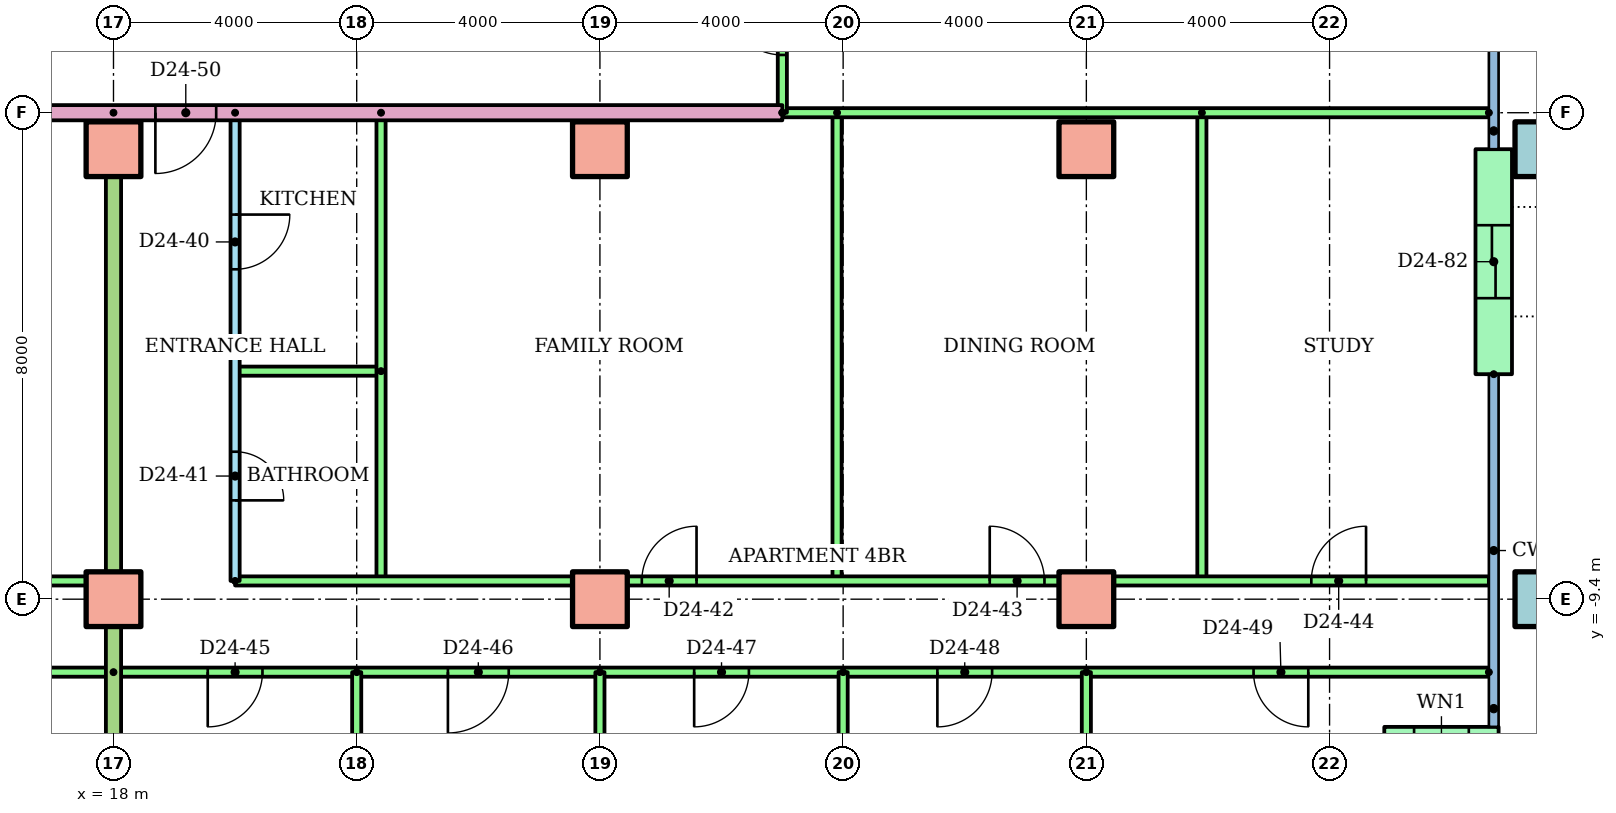
"""IFC4 building model, lengths in metres.
Left out: names, types, materials, properties, quantities, classifications, styles, units other than length and angle.
Written with IfcOpenShell. Run it as: python <this file> out.ifc"""

import sys

from ifc_helpers import new_model, si_unit, direction, frame, frame_2d, origin, origin_2d, place, context, subcontext, project, spatial, rectangle, hollow_rectangle, extrude, element, fill, save


model = new_model("IFC4")
c1 = context("Model", 3, precision=1e-05, world=origin(), true_north=direction((0.0, 1.0)))
c2 = subcontext(c1, "Body", "Model", "MODEL_VIEW")
j1 = project(units=[si_unit("LENGTHUNIT", "METRE"), si_unit("PLANEANGLEUNIT", "RADIAN")], contexts=[c1])
p1 = place(None, origin())
s1 = spatial("IfcSite", under=j1, at=p1, CompositionType="ELEMENT")
p2 = place(p1, origin())
s2 = spatial("IfcBuilding", under=s1, at=p2, CompositionType="ELEMENT")
p3 = place(p2, frame((0.0, 0.0, 93.5)))
s3 = spatial("IfcBuildingStorey", under=s2, at=p3, CompositionType="ELEMENT", Elevation=93.5)
for number, where in (
    (1, (18.0, -9.4, 0.0)),
    (2, (26.0, -9.4, 0.0)),
    (3, (34.0, -9.4, 0.0)),
):
    element("IfcColumn", number, at=place(p3, frame(where)), inside=s3, PredefinedType="COLUMN", context=c2, shape_type="SweptSolid", body=[
        extrude(rectangle(XDim=0.9, YDim=0.9, at=origin_2d()), origin(), (0.0, 0.0, 1.0), 3.2),
    ])
p4 = place(p3, frame((41.5, -9.4, 0.0)))
e4 = element("IfcColumn", 4, at=p4, inside=s3, PredefinedType="COLUMN", context=c2, shape_type="SweptSolid", body=[
    extrude(hollow_rectangle(XDim=0.9, YDim=0.9, WallThickness=0.045, at=origin_2d()), origin(), (0.0, 0.0, 1.0), 3.2),
])
for number, where in (
    (5, (18.0, -2.0, 0.0)),
    (6, (26.0, -2.0, 0.0)),
    (7, (34.0, -2.0, 0.0)),
):
    element("IfcColumn", number, at=place(p3, frame(where)), inside=s3, PredefinedType="COLUMN", context=c2, shape_type="SweptSolid", body=[
        extrude(rectangle(XDim=0.9, YDim=0.9, at=origin_2d()), origin(), (0.0, 0.0, 1.0), 3.2),
    ])
p5 = place(p3, frame((41.5, -2.0, 0.0)))
e8 = element("IfcColumn", 8, at=p5, inside=s3, PredefinedType="COLUMN", context=c2, shape_type="SweptSolid", body=[
    extrude(hollow_rectangle(XDim=0.9, YDim=0.9, WallThickness=0.045, at=origin_2d()), origin(), (0.0, 0.0, 1.0), 3.2),
])
p6 = place(p3, frame((38.9, -11.8, 0.0)))
e9 = element("IfcWall", 9, at=p6, inside=s3, PredefinedType="STANDARD", context=c2, shape_type="SweptSolid", body=[
    extrude(rectangle(XDim=1.88, YDim=0.6, at=frame_2d((0.94, 0.0))), origin(), (0.0, 0.0, 1.0), 2.92),
])
p7 = place(p6, frame((0.49, 0.0, 0.9)))
e10 = element("IfcOpeningElement", 10, at=p7, cuts=e9, PredefinedType="OPENING", context=c2, shape_type="SweptSolid", body=[
    extrude(rectangle(XDim=0.9, YDim=1.5, at=frame_2d((0.45, 0.75))), frame((0.0, 0.31, 0.0), z_axis=(0.0, -1.0, 0.0), x_axis=(1.0, 0.0, 0.0)), (0.0, 0.0, 1.0), 0.62),
])
p8 = place(p3, frame((40.7, -5.7, 0.0), z_axis=(0.0, 0.0, 1.0), x_axis=(0.0, 1.0, 0.0)))
e11 = element("IfcWall", 11, at=p8, inside=s3, PredefinedType="STANDARD", context=c2, shape_type="SweptSolid", body=[
    extrude(rectangle(XDim=3.7, YDim=0.6, at=frame_2d((1.85, 0.0))), origin(), (0.0, 0.0, 1.0), 2.92),
])
p9 = place(p8, frame((1.25, 0.0, 0.0)))
e12 = element("IfcOpeningElement", 12, at=p9, cuts=e11, PredefinedType="OPENING", context=c2, shape_type="SweptSolid", body=[
    extrude(rectangle(XDim=1.2, YDim=2.1, at=frame_2d((0.6, 1.05))), frame((0.0, 0.31, 0.0), z_axis=(0.0, -1.0, 0.0), x_axis=(1.0, 0.0, 0.0)), (0.0, 0.0, 1.0), 0.62),
])
p10 = place(p3, frame((4.0, -9.1, 0.0)))
e13 = element("IfcWall", 13, at=p10, inside=s3, PredefinedType="PARTITIONING", context=c2, shape_type="SweptSolid", body=[
    extrude(rectangle(XDim=14.0, YDim=0.15, at=frame_2d((7.0, 0.0))), origin(), (0.0, 0.0, 1.0), 2.4),
])
p11 = place(p10, frame((3.45, 0.0, 0.0)))
e14 = element("IfcOpeningElement", 14, at=p11, cuts=e13, PredefinedType="OPENING", context=c2, shape_type="SweptSolid", body=[
    extrude(rectangle(XDim=0.9, YDim=2.1, at=frame_2d((0.45, 1.05))), frame((0.0, 0.085, 0.0), z_axis=(0.0, -1.0, 0.0), x_axis=(1.0, 0.0, 0.0)), (0.0, 0.0, 1.0), 0.17),
])
p12 = place(p10, frame((6.825, 0.0, 0.0)))
e15 = element("IfcOpeningElement", 15, at=p12, cuts=e13, PredefinedType="OPENING", context=c2, shape_type="SweptSolid", body=[
    extrude(rectangle(XDim=0.9, YDim=2.1, at=frame_2d((0.45, 1.05))), frame((0.0, 0.085, 0.0), z_axis=(0.0, -1.0, 0.0), x_axis=(1.0, 0.0, 0.0)), (0.0, 0.0, 1.0), 0.17),
])
p13 = place(p10, frame((11.125, 0.0, 0.0)))
e16 = element("IfcOpeningElement", 16, at=p13, cuts=e13, PredefinedType="OPENING", context=c2, shape_type="SweptSolid", body=[
    extrude(rectangle(XDim=0.9, YDim=2.1, at=frame_2d((0.45, 1.05))), frame((0.0, 0.085, 0.0), z_axis=(0.0, -1.0, 0.0), x_axis=(1.0, 0.0, 0.0)), (0.0, 0.0, 1.0), 0.17),
])
p14 = place(p3, frame((18.0, -10.6, 0.0), z_axis=(0.0, 0.0, 1.0), x_axis=(-1.0, 0.0, 0.0)))
e17 = element("IfcWall", 17, at=p14, inside=s3, PredefinedType="PARTITIONING", context=c2, shape_type="SweptSolid", body=[
    extrude(rectangle(XDim=16.0, YDim=0.15, at=frame_2d((8.0, 0.0))), origin(), (0.0, 0.0, 1.0), 2.4),
])
p15 = place(p14, frame((11.5, 0.0, 0.0)))
e18 = element("IfcOpeningElement", 18, at=p15, cuts=e17, PredefinedType="OPENING", context=c2, shape_type="SweptSolid", body=[
    extrude(rectangle(XDim=1.0, YDim=2.1, at=frame_2d((0.5, 1.05))), frame((0.0, 0.085, 0.0), z_axis=(0.0, -1.0, 0.0), x_axis=(1.0, 0.0, 0.0)), (0.0, 0.0, 1.0), 0.17),
])
p16 = place(p14, frame((5.55, 0.0, 0.0)))
e19 = element("IfcOpeningElement", 19, at=p16, cuts=e17, PredefinedType="OPENING", context=c2, shape_type="SweptSolid", body=[
    extrude(rectangle(XDim=0.9, YDim=2.1, at=frame_2d((0.45, 1.05))), frame((0.0, 0.085, 0.0), z_axis=(0.0, -1.0, 0.0), x_axis=(1.0, 0.0, 0.0)), (0.0, 0.0, 1.0), 0.17),
])
p17 = place(p14, frame((1.55, 0.0, 0.0)))
e20 = element("IfcOpeningElement", 20, at=p17, cuts=e17, PredefinedType="OPENING", context=c2, shape_type="SweptSolid", body=[
    extrude(rectangle(XDim=0.9, YDim=2.1, at=frame_2d((0.45, 1.05))), frame((0.0, 0.085, 0.0), z_axis=(0.0, -1.0, 0.0), x_axis=(1.0, 0.0, 0.0)), (0.0, 0.0, 1.0), 0.17),
])
p18 = place(p3, frame((20.0, -1.4, 0.0), z_axis=(0.0, 0.0, 1.0), x_axis=(0.0, -1.0, 0.0)))
e21 = element("IfcWall", 21, at=p18, inside=s3, PredefinedType="PARTITIONING", context=c2, shape_type="SweptSolid", body=[
    extrude(rectangle(XDim=7.7, YDim=0.15, at=frame_2d((3.85, 0.0))), origin(), (0.0, 0.0, 1.0), 2.4),
])
p19 = place(p18, frame((1.675, 0.0, 0.0)))
e22 = element("IfcOpeningElement", 22, at=p19, cuts=e21, PredefinedType="OPENING", context=c2, shape_type="SweptSolid", body=[
    extrude(rectangle(XDim=0.9, YDim=2.1, at=frame_2d((0.45, 1.05))), frame((0.0, 0.085, 0.0), z_axis=(0.0, -1.0, 0.0), x_axis=(1.0, 0.0, 0.0)), (0.0, 0.0, 1.0), 0.17),
])
p20 = place(p18, frame((5.575, 0.0, 0.0)))
e23 = element("IfcOpeningElement", 23, at=p20, cuts=e21, PredefinedType="OPENING", context=c2, shape_type="SweptSolid", body=[
    extrude(rectangle(XDim=0.8, YDim=2.1, at=frame_2d((0.4, 1.05))), frame((0.0, 0.085, 0.0), z_axis=(0.0, -1.0, 0.0), x_axis=(1.0, 0.0, 0.0)), (0.0, 0.0, 1.0), 0.17),
])
p21 = place(p3, frame((22.4, -5.65, 0.0), z_axis=(0.0, 0.0, 1.0), x_axis=(-1.0, 0.0, 0.0)))
e24 = element("IfcWall", 24, at=p21, inside=s3, PredefinedType="PARTITIONING", context=c2, shape_type="SweptSolid", body=[
    extrude(rectangle(XDim=2.4, YDim=0.15, at=frame_2d((1.2, 0.0))), origin(), (0.0, 0.0, 1.0), 2.4),
])
for number, where, z_axis, x_axis in (
    (25, (22.4, -1.4, 0.0), (0.0, 0.0, 1.0), (0.0, -1.0, 0.0)),
    (26, (29.9, -1.4, 0.0), (0.0, 0.0, 1.0), (0.0, -1.0, 0.0)),
    (27, (35.9, -1.4, 0.0), (0.0, 0.0, 1.0), (0.0, -1.0, 0.0)),
):
    element("IfcWall", number, at=place(p3, frame(where, z_axis=z_axis, x_axis=x_axis)), inside=s3, PredefinedType="PARTITIONING", context=c2, shape_type="SweptSolid", body=[
        extrude(rectangle(XDim=7.7, YDim=0.15, at=frame_2d((3.85, 0.0))), origin(), (0.0, 0.0, 1.0), 2.4),
    ])
p22 = place(p3, frame((20.0, -9.1, 0.0)))
e28 = element("IfcWall", 28, at=p22, inside=s3, PredefinedType="PARTITIONING", context=c2, shape_type="SweptSolid", body=[
    extrude(rectangle(XDim=20.62, YDim=0.15, at=frame_2d((10.31, 0.0))), origin(), (0.0, 0.0, 1.0), 2.4),
])
p23 = place(p22, frame((6.689, 0.0, 0.0)))
e29 = element("IfcOpeningElement", 29, at=p23, cuts=e28, PredefinedType="OPENING", context=c2, shape_type="SweptSolid", body=[
    extrude(rectangle(XDim=0.9, YDim=2.1, at=frame_2d((0.45, 1.05))), frame((0.0, 0.085, 0.0), z_axis=(0.0, -1.0, 0.0), x_axis=(1.0, 0.0, 0.0)), (0.0, 0.0, 1.0), 0.17),
])
p24 = place(p22, frame((12.411, 0.0, 0.0)))
e30 = element("IfcOpeningElement", 30, at=p24, cuts=e28, PredefinedType="OPENING", context=c2, shape_type="SweptSolid", body=[
    extrude(rectangle(XDim=0.9, YDim=2.1, at=frame_2d((0.45, 1.05))), frame((0.0, 0.085, 0.0), z_axis=(0.0, -1.0, 0.0), x_axis=(1.0, 0.0, 0.0)), (0.0, 0.0, 1.0), 0.17),
])
p25 = place(p22, frame((17.7, 0.0, 0.0)))
e31 = element("IfcOpeningElement", 31, at=p25, cuts=e28, PredefinedType="OPENING", context=c2, shape_type="SweptSolid", body=[
    extrude(rectangle(XDim=0.9, YDim=2.1, at=frame_2d((0.45, 1.05))), frame((0.0, 0.085, 0.0), z_axis=(0.0, -1.0, 0.0), x_axis=(1.0, 0.0, 0.0)), (0.0, 0.0, 1.0), 0.17),
])
p26 = place(p3, frame((40.62, -10.6, 0.0), z_axis=(0.0, 0.0, 1.0), x_axis=(-1.0, 0.0, 0.0)))
e32 = element("IfcWall", 32, at=p26, inside=s3, PredefinedType="PARTITIONING", context=c2, shape_type="SweptSolid", body=[
    extrude(rectangle(XDim=22.62, YDim=0.15, at=frame_2d((11.31, 0.0))), origin(), (0.0, 0.0, 1.0), 2.4),
])
p27 = place(p26, frame((20.17, 0.0, 0.0)))
e33 = element("IfcOpeningElement", 33, at=p27, cuts=e32, PredefinedType="OPENING", context=c2, shape_type="SweptSolid", body=[
    extrude(rectangle(XDim=0.9, YDim=2.1, at=frame_2d((0.45, 1.05))), frame((0.0, 0.085, 0.0), z_axis=(0.0, -1.0, 0.0), x_axis=(1.0, 0.0, 0.0)), (0.0, 0.0, 1.0), 0.17),
])
p28 = place(p26, frame((16.12, 0.0, 0.0)))
e34 = element("IfcOpeningElement", 34, at=p28, cuts=e32, PredefinedType="OPENING", context=c2, shape_type="SweptSolid", body=[
    extrude(rectangle(XDim=1.0, YDim=2.1, at=frame_2d((0.5, 1.05))), frame((0.0, 0.085, 0.0), z_axis=(0.0, -1.0, 0.0), x_axis=(1.0, 0.0, 0.0)), (0.0, 0.0, 1.0), 0.17),
])
p29 = place(p26, frame((12.17, 0.0, 0.0)))
e35 = element("IfcOpeningElement", 35, at=p29, cuts=e32, PredefinedType="OPENING", context=c2, shape_type="SweptSolid", body=[
    extrude(rectangle(XDim=0.9, YDim=2.1, at=frame_2d((0.45, 1.05))), frame((0.0, 0.085, 0.0), z_axis=(0.0, -1.0, 0.0), x_axis=(1.0, 0.0, 0.0)), (0.0, 0.0, 1.0), 0.17),
])
p30 = place(p26, frame((8.17, 0.0, 0.0)))
e36 = element("IfcOpeningElement", 36, at=p30, cuts=e32, PredefinedType="OPENING", context=c2, shape_type="SweptSolid", body=[
    extrude(rectangle(XDim=0.9, YDim=2.1, at=frame_2d((0.45, 1.05))), frame((0.0, 0.085, 0.0), z_axis=(0.0, -1.0, 0.0), x_axis=(1.0, 0.0, 0.0)), (0.0, 0.0, 1.0), 0.17),
])
p31 = place(p26, frame((2.97, 0.0, 0.0)))
e37 = element("IfcOpeningElement", 37, at=p31, cuts=e32, PredefinedType="OPENING", context=c2, shape_type="SweptSolid", body=[
    extrude(rectangle(XDim=0.9, YDim=2.1, at=frame_2d((0.45, 1.05))), frame((0.0, 0.085, 0.0), z_axis=(0.0, -1.0, 0.0), x_axis=(1.0, 0.0, 0.0)), (0.0, 0.0, 1.0), 0.17),
])
p32 = place(p3, frame((22.0, -10.6, 0.0), z_axis=(0.0, 0.0, 1.0), x_axis=(0.0, -1.0, 0.0)))
e38 = element("IfcWall", 38, at=p32, inside=s3, PredefinedType="PARTITIONING", context=c2, shape_type="SweptSolid", body=[
    extrude(rectangle(XDim=5.621, YDim=0.15, at=frame_2d((2.811, 0.0))), origin(), (0.0, 0.0, 1.0), 2.4),
])
p33 = place(p3, frame((26.0, -10.6, 0.0), z_axis=(0.0, 0.0, 1.0), x_axis=(0.0, -1.0, 0.0)))
e39 = element("IfcWall", 39, at=p33, inside=s3, PredefinedType="PARTITIONING", context=c2, shape_type="SweptSolid", body=[
    extrude(rectangle(XDim=5.61, YDim=0.15, at=frame_2d((2.805, 0.0))), origin(), (0.0, 0.0, 1.0), 2.4),
])
p34 = place(p3, frame((30.0, -10.6, 0.0), z_axis=(0.0, 0.0, 1.0), x_axis=(0.0, -1.0, 0.0)))
e40 = element("IfcWall", 40, at=p34, inside=s3, PredefinedType="PARTITIONING", context=c2, shape_type="SweptSolid", body=[
    extrude(rectangle(XDim=5.621, YDim=0.15, at=frame_2d((2.811, 0.0))), origin(), (0.0, 0.0, 1.0), 2.4),
])
p35 = place(p3, frame((34.0, -10.6, 0.0), z_axis=(0.0, 0.0, 1.0), x_axis=(0.0, -1.0, 0.0)))
e41 = element("IfcWall", 41, at=p35, inside=s3, PredefinedType="PARTITIONING", context=c2, shape_type="SweptSolid", body=[
    extrude(rectangle(XDim=5.61, YDim=0.15, at=frame_2d((2.805, 0.0))), origin(), (0.0, 0.0, 1.0), 2.4),
])
p36 = place(p3, frame((18.0, -1.4, 0.0), z_axis=(0.0, 0.0, 1.0), x_axis=(0.0, -1.0, 0.0)))
e42 = element("IfcWall", 42, at=p36, inside=s3, PredefinedType="PARTITIONING", context=c2, shape_type="SweptSolid", body=[
    extrude(rectangle(XDim=14.81, YDim=0.25, at=frame_2d((7.405, 0.0))), origin(), (0.0, 0.0, 1.0), 2.4),
])
p37 = place(p3, frame((29.0, -1.4, 0.0), z_axis=(0.0, 0.0, 1.0), x_axis=(-1.0, 0.0, 0.0)))
e43 = element("IfcWall", 43, at=p37, inside=s3, PredefinedType="PARTITIONING", context=c2, shape_type="SweptSolid", body=[
    extrude(rectangle(XDim=15.0, YDim=0.25, at=frame_2d((7.5, 0.0))), origin(), (0.0, 0.0, 1.0), 2.4),
])
p38 = place(p37, frame((9.311, 0.0, 0.0)))
e44 = element("IfcOpeningElement", 44, at=p38, cuts=e43, PredefinedType="OPENING", context=c2, shape_type="SweptSolid", body=[
    extrude(rectangle(XDim=1.0, YDim=2.1, at=frame_2d((0.5, 1.05))), frame((0.0, 0.135, 0.0), z_axis=(0.0, -1.0, 0.0), x_axis=(1.0, 0.0, 0.0)), (0.0, 0.0, 1.0), 0.27),
])
p39 = place(p3, frame((40.62, -1.4, 0.0), z_axis=(0.0, 0.0, 1.0), x_axis=(-1.0, 0.0, 0.0)))
e45 = element("IfcWall", 45, at=p39, inside=s3, PredefinedType="PARTITIONING", context=c2, shape_type="SweptSolid", body=[
    extrude(rectangle(XDim=11.62, YDim=0.15, at=frame_2d((5.81, 0.0))), origin(), (0.0, 0.0, 1.0), 2.4),
])
p40 = place(p3, frame((29.0, -1.4, 0.0), z_axis=(0.0, 0.0, 1.0), x_axis=(0.0, 1.0, 0.0)))
e46 = element("IfcWall", 46, at=p40, inside=s3, PredefinedType="PARTITIONING", context=c2, shape_type="SweptSolid", body=[
    extrude(rectangle(XDim=2.8, YDim=0.15, at=frame_2d((1.4, 0.0))), origin(), (0.0, 0.0, 1.0), 2.4),
])
p41 = place(p40, frame((0.95, 0.0, 0.0)))
e47 = element("IfcOpeningElement", 47, at=p41, cuts=e46, PredefinedType="OPENING", context=c2, shape_type="SweptSolid", body=[
    extrude(rectangle(XDim=0.9, YDim=2.1, at=frame_2d((0.45, 1.05))), frame((0.0, 0.085, 0.0), z_axis=(0.0, -1.0, 0.0), x_axis=(1.0, 0.0, 0.0)), (0.0, 0.0, 1.0), 0.17),
])
p42 = place(p19, origin())
e48 = element("IfcDoor", 48, at=p42, inside=s3, OperationType="SINGLE_SWING_LEFT", PredefinedType="DOOR", context=c2, shape_type="SweptSolid", body=[
    extrude(rectangle(XDim=0.9, YDim=2.1, at=frame_2d((0.45, 1.05))), frame((0.0, 0.025, 0.0), z_axis=(0.0, -1.0, 0.0), x_axis=(1.0, 0.0, 0.0)), (0.0, 0.0, 1.0), 0.05),
])
fill(e22, e48)
p43 = place(p20, origin())
e49 = element("IfcDoor", 49, at=p43, inside=s3, OperationType="SINGLE_SWING_RIGHT", PredefinedType="DOOR", context=c2, shape_type="SweptSolid", body=[
    extrude(rectangle(XDim=0.8, YDim=2.1, at=frame_2d((0.4, 1.05))), frame((0.0, 0.025, 0.0), z_axis=(0.0, -1.0, 0.0), x_axis=(1.0, 0.0, 0.0)), (0.0, 0.0, 1.0), 0.05),
])
fill(e23, e49)
p44 = place(p23, origin())
e50 = element("IfcDoor", 50, at=p44, inside=s3, OperationType="SINGLE_SWING_RIGHT", PredefinedType="DOOR", context=c2, shape_type="SweptSolid", body=[
    extrude(rectangle(XDim=0.9, YDim=2.1, at=frame_2d((0.45, 1.05))), frame((0.0, 0.025, 0.0), z_axis=(0.0, -1.0, 0.0), x_axis=(1.0, 0.0, 0.0)), (0.0, 0.0, 1.0), 0.05),
])
fill(e29, e50)
p45 = place(p24, origin())
e51 = element("IfcDoor", 51, at=p45, inside=s3, OperationType="SINGLE_SWING_LEFT", PredefinedType="DOOR", context=c2, shape_type="SweptSolid", body=[
    extrude(rectangle(XDim=0.9, YDim=2.1, at=frame_2d((0.45, 1.05))), frame((0.0, 0.025, 0.0), z_axis=(0.0, -1.0, 0.0), x_axis=(1.0, 0.0, 0.0)), (0.0, 0.0, 1.0), 0.05),
])
fill(e30, e51)
p46 = place(p25, origin())
e52 = element("IfcDoor", 52, at=p46, inside=s3, OperationType="SINGLE_SWING_RIGHT", PredefinedType="DOOR", context=c2, shape_type="SweptSolid", body=[
    extrude(rectangle(XDim=0.9, YDim=2.1, at=frame_2d((0.45, 1.05))), frame((0.0, 0.025, 0.0), z_axis=(0.0, -1.0, 0.0), x_axis=(1.0, 0.0, 0.0)), (0.0, 0.0, 1.0), 0.05),
])
fill(e31, e52)
p47 = place(p27, origin())
e53 = element("IfcDoor", 53, at=p47, inside=s3, OperationType="SINGLE_SWING_RIGHT", PredefinedType="DOOR", context=c2, shape_type="SweptSolid", body=[
    extrude(rectangle(XDim=0.9, YDim=2.1, at=frame_2d((0.45, 1.05))), frame((0.0, 0.025, 0.0), z_axis=(0.0, -1.0, 0.0), x_axis=(1.0, 0.0, 0.0)), (0.0, 0.0, 1.0), 0.05),
])
fill(e33, e53)
p48 = place(p28, origin())
e54 = element("IfcDoor", 54, at=p48, inside=s3, OperationType="SINGLE_SWING_RIGHT", PredefinedType="DOOR", context=c2, shape_type="SweptSolid", body=[
    extrude(rectangle(XDim=1.0, YDim=2.1, at=frame_2d((0.5, 1.05))), frame((0.0, 0.025, 0.0), z_axis=(0.0, -1.0, 0.0), x_axis=(1.0, 0.0, 0.0)), (0.0, 0.0, 1.0), 0.05),
])
fill(e34, e54)
p49 = place(p29, origin())
e55 = element("IfcDoor", 55, at=p49, inside=s3, OperationType="SINGLE_SWING_RIGHT", PredefinedType="DOOR", context=c2, shape_type="SweptSolid", body=[
    extrude(rectangle(XDim=0.9, YDim=2.1, at=frame_2d((0.45, 1.05))), frame((0.0, 0.025, 0.0), z_axis=(0.0, -1.0, 0.0), x_axis=(1.0, 0.0, 0.0)), (0.0, 0.0, 1.0), 0.05),
])
fill(e35, e55)
p50 = place(p30, origin())
e56 = element("IfcDoor", 56, at=p50, inside=s3, OperationType="SINGLE_SWING_RIGHT", PredefinedType="DOOR", context=c2, shape_type="SweptSolid", body=[
    extrude(rectangle(XDim=0.9, YDim=2.1, at=frame_2d((0.45, 1.05))), frame((0.0, 0.025, 0.0), z_axis=(0.0, -1.0, 0.0), x_axis=(1.0, 0.0, 0.0)), (0.0, 0.0, 1.0), 0.05),
])
fill(e36, e56)
p51 = place(p31, origin())
e57 = element("IfcDoor", 57, at=p51, inside=s3, OperationType="SINGLE_SWING_LEFT", PredefinedType="DOOR", context=c2, shape_type="SweptSolid", body=[
    extrude(rectangle(XDim=0.9, YDim=2.1, at=frame_2d((0.45, 1.05))), frame((0.0, 0.025, 0.0), z_axis=(0.0, -1.0, 0.0), x_axis=(1.0, 0.0, 0.0)), (0.0, 0.0, 1.0), 0.05),
])
fill(e37, e57)
p52 = place(p38, origin())
e58 = element("IfcDoor", 58, at=p52, inside=s3, OperationType="SINGLE_SWING_RIGHT", PredefinedType="DOOR", context=c2, shape_type="SweptSolid", body=[
    extrude(rectangle(XDim=1.0, YDim=2.1, at=frame_2d((0.5, 1.05))), frame((0.0, 0.025, 0.0), z_axis=(0.0, -1.0, 0.0), x_axis=(1.0, 0.0, 0.0)), (0.0, 0.0, 1.0), 0.05),
])
fill(e44, e58)
p53 = place(p41, origin())
e59 = element("IfcDoor", 59, at=p53, inside=s3, OperationType="SINGLE_SWING_RIGHT", PredefinedType="DOOR", context=c2, shape_type="SweptSolid", body=[
    extrude(rectangle(XDim=0.9, YDim=2.1, at=frame_2d((0.45, 1.05))), frame((0.0, 0.025, 0.0), z_axis=(0.0, -1.0, 0.0), x_axis=(1.0, 0.0, 0.0)), (0.0, 0.0, 1.0), 0.05),
])
fill(e47, e59)
p54 = place(p9, origin())
e60 = element("IfcDoor", 60, at=p54, inside=s3, OperationType="SLIDING_TO_LEFT", PredefinedType="DOOR", context=c2, shape_type="SweptSolid", body=[
    extrude(rectangle(XDim=1.2, YDim=2.1, at=frame_2d((0.6, 1.05))), frame((0.0, 0.025, 0.0), z_axis=(0.0, -1.0, 0.0), x_axis=(1.0, 0.0, 0.0)), (0.0, 0.0, 1.0), 0.05),
])
fill(e12, e60)
save(model, sys.argv[1])
